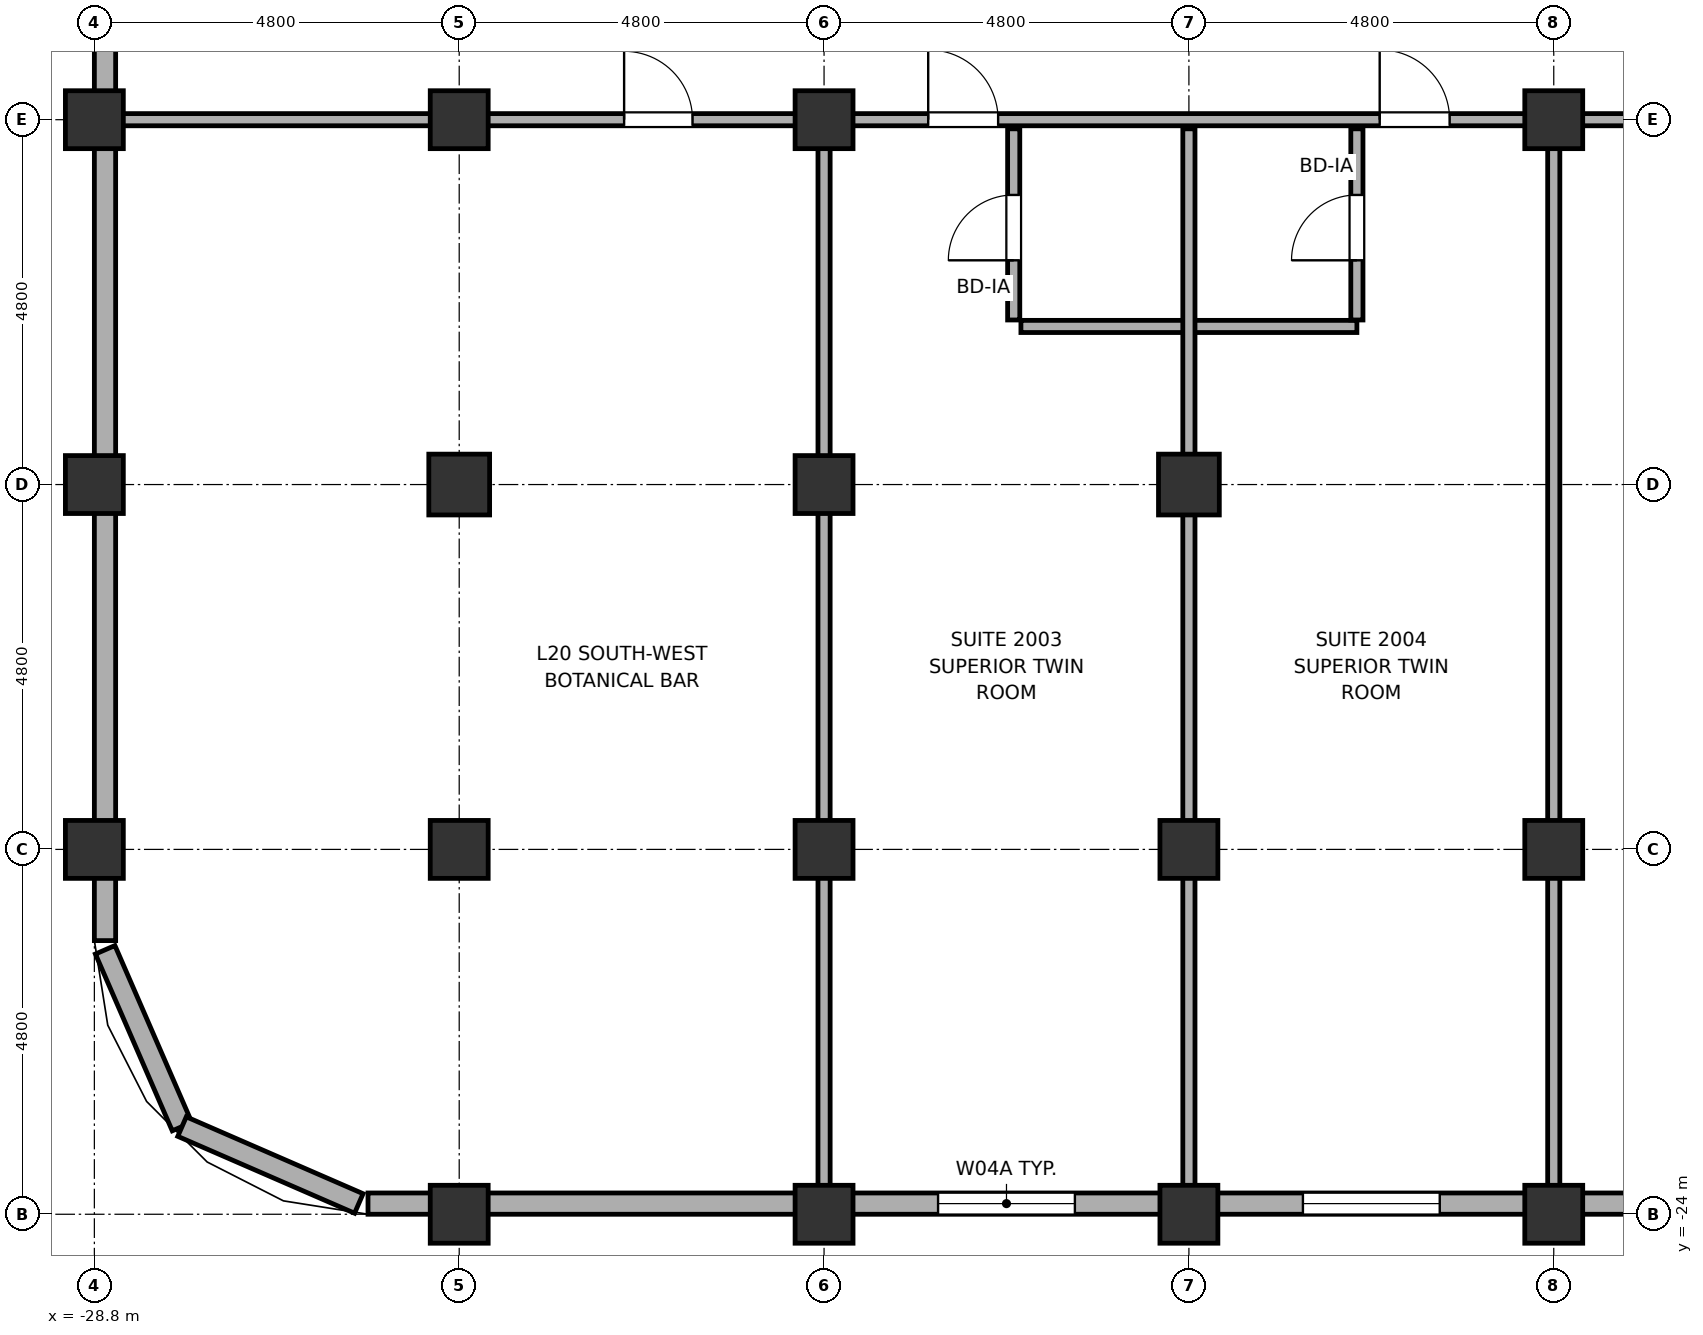
"""IFC4 building model, lengths in metres.
Left out: names, types, materials, properties, quantities, classifications, styles, units other than length and angle.
Written with IfcOpenShell. Run it as: python <this file> out.ifc"""

import sys

from ifc_helpers import new_model, si_unit, direction, frame, frame_2d, origin, origin_2d, place, context, subcontext, project, spatial, rectangle, hollow_rectangle, hollow_circle, extrude, element, fill, save


model = new_model("IFC4")
c1 = context("Model", 3, precision=1e-05, world=origin(), true_north=direction((0.0, 1.0)))
c2 = subcontext(c1, "Body", "Model", "MODEL_VIEW")
j1 = project(units=[si_unit("LENGTHUNIT", "METRE"), si_unit("PLANEANGLEUNIT", "RADIAN")], contexts=[c1])
p1 = place(None, origin())
s1 = spatial("IfcSite", under=j1, at=p1, CompositionType="ELEMENT")
p2 = place(p1, origin())
s2 = spatial("IfcBuilding", under=s1, at=p2, CompositionType="ELEMENT")
p3 = place(p2, frame((0.0, 0.0, 85.5)))
s3 = spatial("IfcBuildingStorey", under=s2, at=p3, CompositionType="ELEMENT", Elevation=85.5)
for number, where, z_axis, x_axis in (
    (1, (-28.8, -19.2, 0.0), (0.0, 0.0, 1.0), (1.0, 0.0, 0.0)),
    (2, (-28.8, -14.4, 0.0), (0.0, 0.0, 1.0), (1.0, 0.0, 0.0)),
    (3, (-28.8, -9.6, 0.0), (0.0, 0.0, 1.0), (1.0, 0.0, 0.0)),
    (4, (-24.0, -24.0, 0.0), (0.0, 0.0, 1.0), (1.0, 0.0, 0.0)),
    (5, (-24.0, -19.2, 0.0), (0.0, 0.0, 1.0), (1.0, 0.0, 0.0)),
):
    element("IfcColumn", number, at=place(p3, frame(where, z_axis=z_axis, x_axis=x_axis)), inside=s3, PredefinedType="COLUMN", context=c2, shape_type="SweptSolid", body=[
        extrude(hollow_circle(Radius=0.381, WallThickness=0.032, at=origin_2d()), origin(), (0.0, 0.0, 1.0), 3.7),
    ])
p4 = place(p3, frame((-24.0, -14.4, 0.0), z_axis=(0.0, 0.0, 1.0), x_axis=(1.0, 0.0, 0.0)))
e6 = element("IfcColumn", 6, at=p4, inside=s3, PredefinedType="COLUMN", context=c2, shape_type="SweptSolid", body=[
    extrude(hollow_rectangle(XDim=0.8, YDim=0.8, WallThickness=0.036, at=origin_2d()), origin(), (0.0, 0.0, 1.0), 3.7),
])
for number, where, z_axis, x_axis in (
    (7, (-24.0, -9.6, 0.0), (0.0, 0.0, 1.0), (1.0, 0.0, 0.0)),
    (8, (-19.2, -24.0, 0.0), (0.0, 0.0, 1.0), (1.0, 0.0, 0.0)),
    (9, (-19.2, -19.2, 0.0), (0.0, 0.0, 1.0), (1.0, 0.0, 0.0)),
    (10, (-19.2, -14.4, 0.0), (0.0, 0.0, 1.0), (1.0, 0.0, 0.0)),
    (11, (-19.2, -9.6, 0.0), (0.0, 0.0, 1.0), (1.0, 0.0, 0.0)),
    (12, (-14.4, -24.0, 0.0), (0.0, 0.0, 1.0), (1.0, 0.0, 0.0)),
    (13, (-14.4, -19.2, 0.0), (0.0, 0.0, 1.0), (1.0, 0.0, 0.0)),
):
    element("IfcColumn", number, at=place(p3, frame(where, z_axis=z_axis, x_axis=x_axis)), inside=s3, PredefinedType="COLUMN", context=c2, shape_type="SweptSolid", body=[
        extrude(hollow_circle(Radius=0.381, WallThickness=0.032, at=origin_2d()), origin(), (0.0, 0.0, 1.0), 3.7),
    ])
p5 = place(p3, frame((-14.4, -14.4, 0.0), z_axis=(0.0, 0.0, 1.0), x_axis=(1.0, 0.0, 0.0)))
e14 = element("IfcColumn", 14, at=p5, inside=s3, PredefinedType="COLUMN", context=c2, shape_type="SweptSolid", body=[
    extrude(hollow_rectangle(XDim=0.8, YDim=0.8, WallThickness=0.036, at=origin_2d()), origin(), (0.0, 0.0, 1.0), 3.7),
])
for number, where, z_axis, x_axis in (
    (15, (-9.6, -24.0, 0.0), (0.0, 0.0, 1.0), (1.0, 0.0, 0.0)),
    (16, (-9.6, -19.2, 0.0), (0.0, 0.0, 1.0), (1.0, 0.0, 0.0)),
    (17, (-9.6, -9.6, 0.0), (0.0, 0.0, 1.0), (1.0, 0.0, 0.0)),
):
    element("IfcColumn", number, at=place(p3, frame(where, z_axis=z_axis, x_axis=x_axis)), inside=s3, PredefinedType="COLUMN", context=c2, shape_type="SweptSolid", body=[
        extrude(hollow_circle(Radius=0.381, WallThickness=0.032, at=origin_2d()), origin(), (0.0, 0.0, 1.0), 3.7),
    ])
p6 = place(p3, frame((-28.658, -20.521, 0.0), z_axis=(0.0, 0.0, 1.0), x_axis=(0.398792985289, -0.917040977756, 0.0)))
e18 = element("IfcWall", 18, at=p6, inside=s3, PredefinedType="SOLIDWALL", context=c2, shape_type="SweptSolid", body=[
    extrude(rectangle(XDim=2.536, YDim=0.28, at=frame_2d((1.268, 0.0))), origin(), (0.0, 0.0, 1.0), 2.05),
])
p7 = place(p3, frame((-27.646, -22.847, 0.0), z_axis=(0.0, 0.0, 1.0), x_axis=(0.917060872934, -0.398747232384, 0.0)))
e19 = element("IfcWall", 19, at=p7, inside=s3, PredefinedType="SOLIDWALL", context=c2, shape_type="SweptSolid", body=[
    extrude(rectangle(XDim=2.536, YDim=0.28, at=frame_2d((1.268, 0.0))), origin(), (0.0, 0.0, 1.0), 2.05),
])
p8 = place(p3, frame((-25.2, -23.86, 0.0), z_axis=(0.0, 0.0, 1.0), x_axis=(1.0, 0.0, 0.0)))
e20 = element("IfcWall", 20, at=p8, inside=s3, PredefinedType="SOLIDWALL", context=c2, shape_type="SweptSolid", body=[
    extrude(rectangle(XDim=20.45, YDim=0.28, at=frame_2d((10.225, 0.0))), origin(), (0.0, 0.0, 1.0), 2.05),
])
p9 = place(p8, frame((7.5, 0.0, 0.75)))
e21 = element("IfcOpeningElement", 21, at=p9, cuts=e20, PredefinedType="OPENING", context=c2, shape_type="SweptSolid", body=[
    extrude(rectangle(XDim=1.8, YDim=1.15, at=frame_2d((0.9, 0.575))), frame((0.0, 0.155, 0.0), z_axis=(0.0, -1.0, 0.0), x_axis=(1.0, 0.0, 0.0)), (0.0, 0.0, 1.0), 0.31),
])
p10 = place(p8, frame((12.3, 0.0, 0.75)))
e22 = element("IfcOpeningElement", 22, at=p10, cuts=e20, PredefinedType="OPENING", context=c2, shape_type="SweptSolid", body=[
    extrude(rectangle(XDim=1.8, YDim=1.15, at=frame_2d((0.9, 0.575))), frame((0.0, 0.155, 0.0), z_axis=(0.0, -1.0, 0.0), x_axis=(1.0, 0.0, 0.0)), (0.0, 0.0, 1.0), 0.31),
])
p11 = place(p8, frame((17.1, 0.0, 0.75)))
e23 = element("IfcOpeningElement", 23, at=p11, cuts=e20, PredefinedType="OPENING", context=c2, shape_type="SweptSolid", body=[
    extrude(rectangle(XDim=1.8, YDim=1.15, at=frame_2d((0.9, 0.575))), frame((0.0, 0.155, 0.0), z_axis=(0.0, -1.0, 0.0), x_axis=(1.0, 0.0, 0.0)), (0.0, 0.0, 1.0), 0.31),
])
p12 = place(p3, frame((-28.66, -20.4, 0.0), z_axis=(0.0, 0.0, 1.0), x_axis=(0.0, 1.0, 0.0)))
e24 = element("IfcWall", 24, at=p12, inside=s3, PredefinedType="SOLIDWALL", context=c2, shape_type="SweptSolid", body=[
    extrude(rectangle(XDim=20.38, YDim=0.28, at=frame_2d((10.19, 0.0))), origin(), (0.0, 0.0, 1.0), 2.05),
])
p13 = place(p12, frame((17.25, 0.0, 0.75)))
e25 = element("IfcOpeningElement", 25, at=p13, cuts=e24, PredefinedType="OPENING", context=c2, shape_type="SweptSolid", body=[
    extrude(rectangle(XDim=1.5, YDim=1.15, at=frame_2d((0.75, 0.575))), frame((0.0, 0.155, 0.0), z_axis=(0.0, -1.0, 0.0), x_axis=(1.0, 0.0, 0.0)), (0.0, 0.0, 1.0), 0.31),
])
p14 = place(p3, frame((-16.61, -12.32, 0.0), z_axis=(0.0, 0.0, 1.0), x_axis=(1.0, 0.0, 0.0)))
e26 = element("IfcWall", 26, at=p14, inside=s3, PredefinedType="PARTITIONING", context=c2, shape_type="SweptSolid", body=[
    extrude(rectangle(XDim=4.42, YDim=0.16, at=frame_2d((2.21, 0.0))), origin(), (0.0, 0.0, 1.0), 2.75),
])
p15 = place(p3, frame((-28.51, -9.6, 0.0), z_axis=(0.0, 0.0, 1.0), x_axis=(1.0, 0.0, 0.0)))
e27 = element("IfcWall", 27, at=p15, inside=s3, PredefinedType="PARTITIONING", context=c2, shape_type="SweptSolid", body=[
    extrude(rectangle(XDim=61.82, YDim=0.16, at=frame_2d((30.91, 0.0))), origin(), (0.0, 0.0, 1.0), 2.05),
])
p16 = place(p15, frame((6.679, 0.0, 0.0)))
e28 = element("IfcOpeningElement", 28, at=p16, cuts=e27, PredefinedType="OPENING", context=c2, shape_type="SweptSolid", body=[
    extrude(rectangle(XDim=0.9, YDim=2.02, at=frame_2d((0.45, 1.01))), frame((0.0, 0.095, 0.0), z_axis=(0.0, -1.0, 0.0), x_axis=(1.0, 0.0, 0.0)), (0.0, 0.0, 1.0), 0.19),
])
p17 = place(p15, frame((54.5, 0.0, 0.0)))
e29 = element("IfcOpeningElement", 29, at=p17, cuts=e27, PredefinedType="OPENING", context=c2, shape_type="SweptSolid", body=[
    extrude(rectangle(XDim=0.9, YDim=2.02, at=frame_2d((0.45, 1.01))), frame((0.0, 0.095, 0.0), z_axis=(0.0, -1.0, 0.0), x_axis=(1.0, 0.0, 0.0)), (0.0, 0.0, 1.0), 0.19),
])
p18 = place(p15, frame((10.68, 0.0, 0.0)))
e30 = element("IfcOpeningElement", 30, at=p18, cuts=e27, PredefinedType="OPENING", context=c2, shape_type="SweptSolid", body=[
    extrude(rectangle(XDim=0.92, YDim=2.02, at=frame_2d((0.46, 1.01))), frame((0.0, 0.095, 0.0), z_axis=(0.0, -1.0, 0.0), x_axis=(1.0, 0.0, 0.0)), (0.0, 0.0, 1.0), 0.19),
])
p19 = place(p15, frame((16.62, 0.0, 0.0)))
e31 = element("IfcOpeningElement", 31, at=p19, cuts=e27, PredefinedType="OPENING", context=c2, shape_type="SweptSolid", body=[
    extrude(rectangle(XDim=0.92, YDim=2.02, at=frame_2d((0.46, 1.01))), frame((0.0, 0.095, 0.0), z_axis=(0.0, -1.0, 0.0), x_axis=(1.0, 0.0, 0.0)), (0.0, 0.0, 1.0), 0.19),
])
p20 = place(p15, frame((20.28, 0.0, 0.0)))
e32 = element("IfcOpeningElement", 32, at=p20, cuts=e27, PredefinedType="OPENING", context=c2, shape_type="SweptSolid", body=[
    extrude(rectangle(XDim=0.92, YDim=2.02, at=frame_2d((0.46, 1.01))), frame((0.0, 0.095, 0.0), z_axis=(0.0, -1.0, 0.0), x_axis=(1.0, 0.0, 0.0)), (0.0, 0.0, 1.0), 0.19),
])
p21 = place(p15, frame((26.22, 0.0, 0.0)))
e33 = element("IfcOpeningElement", 33, at=p21, cuts=e27, PredefinedType="OPENING", context=c2, shape_type="SweptSolid", body=[
    extrude(rectangle(XDim=0.92, YDim=2.02, at=frame_2d((0.46, 1.01))), frame((0.0, 0.095, 0.0), z_axis=(0.0, -1.0, 0.0), x_axis=(1.0, 0.0, 0.0)), (0.0, 0.0, 1.0), 0.19),
])
p22 = place(p15, frame((29.88, 0.0, 0.0)))
e34 = element("IfcOpeningElement", 34, at=p22, cuts=e27, PredefinedType="OPENING", context=c2, shape_type="SweptSolid", body=[
    extrude(rectangle(XDim=0.92, YDim=2.02, at=frame_2d((0.46, 1.01))), frame((0.0, 0.095, 0.0), z_axis=(0.0, -1.0, 0.0), x_axis=(1.0, 0.0, 0.0)), (0.0, 0.0, 1.0), 0.19),
])
p23 = place(p15, frame((35.82, 0.0, 0.0)))
e35 = element("IfcOpeningElement", 35, at=p23, cuts=e27, PredefinedType="OPENING", context=c2, shape_type="SweptSolid", body=[
    extrude(rectangle(XDim=0.92, YDim=2.02, at=frame_2d((0.46, 1.01))), frame((0.0, 0.095, 0.0), z_axis=(0.0, -1.0, 0.0), x_axis=(1.0, 0.0, 0.0)), (0.0, 0.0, 1.0), 0.19),
])
p24 = place(p15, frame((40.06, 0.0, 0.0)))
e36 = element("IfcOpeningElement", 36, at=p24, cuts=e27, PredefinedType="OPENING", context=c2, shape_type="SweptSolid", body=[
    extrude(rectangle(XDim=0.9, YDim=2.02, at=frame_2d((0.45, 1.01))), frame((0.0, 0.095, 0.0), z_axis=(0.0, -1.0, 0.0), x_axis=(1.0, 0.0, 0.0)), (0.0, 0.0, 1.0), 0.19),
])
p25 = place(p15, frame((44.86, 0.0, 0.0)))
e37 = element("IfcOpeningElement", 37, at=p25, cuts=e27, PredefinedType="OPENING", context=c2, shape_type="SweptSolid", body=[
    extrude(rectangle(XDim=0.9, YDim=2.02, at=frame_2d((0.45, 1.01))), frame((0.0, 0.095, 0.0), z_axis=(0.0, -1.0, 0.0), x_axis=(1.0, 0.0, 0.0)), (0.0, 0.0, 1.0), 0.19),
])
p26 = place(p15, frame((49.08, 0.0, 0.0)))
e38 = element("IfcOpeningElement", 38, at=p26, cuts=e27, PredefinedType="OPENING", context=c2, shape_type="SweptSolid", body=[
    extrude(rectangle(XDim=0.92, YDim=2.02, at=frame_2d((0.46, 1.01))), frame((0.0, 0.095, 0.0), z_axis=(0.0, -1.0, 0.0), x_axis=(1.0, 0.0, 0.0)), (0.0, 0.0, 1.0), 0.19),
])
p27 = place(p3, frame((-19.2, -23.71, 0.0), z_axis=(0.0, 0.0, 1.0), x_axis=(0.0, 1.0, 0.0)))
e39 = element("IfcWall", 39, at=p27, inside=s3, PredefinedType="PARTITIONING", context=c2, shape_type="SweptSolid", body=[
    extrude(rectangle(XDim=13.99, YDim=0.16, at=frame_2d((6.995, 0.0))), origin(), (0.0, 0.0, 1.0), 2.05),
])
p28 = place(p3, frame((-16.705, -12.235, 0.0), z_axis=(0.0, 0.0, 1.0), x_axis=(0.0, 1.0, 0.0)))
e40 = element("IfcWall", 40, at=p28, inside=s3, PredefinedType="PARTITIONING", context=c2, shape_type="SweptSolid", body=[
    extrude(rectangle(XDim=2.515, YDim=0.16, at=frame_2d((1.258, 0.0))), origin(), (0.0, 0.0, 1.0), 2.05),
])
p29 = place(p28, frame((0.785, 0.0, 0.0)))
e41 = element("IfcOpeningElement", 41, at=p29, cuts=e40, PredefinedType="OPENING", context=c2, shape_type="SweptSolid", body=[
    extrude(rectangle(XDim=0.86, YDim=2.02, at=frame_2d((0.43, 1.01))), frame((0.0, 0.095, 0.0), z_axis=(0.0, -1.0, 0.0), x_axis=(1.0, 0.0, 0.0)), (0.0, 0.0, 1.0), 0.19),
])
p30 = place(p3, frame((-14.4, -23.71, 0.0), z_axis=(0.0, 0.0, 1.0), x_axis=(0.0, 1.0, 0.0)))
e42 = element("IfcWall", 42, at=p30, inside=s3, PredefinedType="PARTITIONING", context=c2, shape_type="SweptSolid", body=[
    extrude(rectangle(XDim=13.99, YDim=0.16, at=frame_2d((6.995, 0.0))), origin(), (0.0, 0.0, 1.0), 2.05),
])
p31 = place(p3, frame((-12.19, -12.235, 0.0), z_axis=(0.0, 0.0, 1.0), x_axis=(0.0, 1.0, 0.0)))
e43 = element("IfcWall", 43, at=p31, inside=s3, PredefinedType="PARTITIONING", context=c2, shape_type="SweptSolid", body=[
    extrude(rectangle(XDim=2.515, YDim=0.16, at=frame_2d((1.258, 0.0))), origin(), (0.0, 0.0, 1.0), 2.05),
])
p32 = place(p31, frame((0.785, 0.0, 0.0)))
e44 = element("IfcOpeningElement", 44, at=p32, cuts=e43, PredefinedType="OPENING", context=c2, shape_type="SweptSolid", body=[
    extrude(rectangle(XDim=0.86, YDim=2.02, at=frame_2d((0.43, 1.01))), frame((0.0, 0.095, 0.0), z_axis=(0.0, -1.0, 0.0), x_axis=(1.0, 0.0, 0.0)), (0.0, 0.0, 1.0), 0.19),
])
p33 = place(p3, frame((-9.6, -23.71, 0.0), z_axis=(0.0, 0.0, 1.0), x_axis=(0.0, 1.0, 0.0)))
e45 = element("IfcWall", 45, at=p33, inside=s3, PredefinedType="PARTITIONING", context=c2, shape_type="SweptSolid", body=[
    extrude(rectangle(XDim=13.99, YDim=0.16, at=frame_2d((6.995, 0.0))), origin(), (0.0, 0.0, 1.0), 2.05),
])
p34 = place(p9, origin())
e46 = element("IfcWindow", 46, at=p34, inside=s3, PartitioningType="SINGLE_PANEL", PredefinedType="WINDOW", context=c2, shape_type="SweptSolid", body=[
    extrude(rectangle(XDim=1.8, YDim=1.15, at=frame_2d((0.9, 0.575))), frame((0.0, 0.03, 0.0), z_axis=(0.0, -1.0, 0.0), x_axis=(1.0, 0.0, 0.0)), (0.0, 0.0, 1.0), 0.06),
])
fill(e21, e46)
p35 = place(p10, origin())
e47 = element("IfcWindow", 47, at=p35, inside=s3, PartitioningType="SINGLE_PANEL", PredefinedType="WINDOW", context=c2, shape_type="SweptSolid", body=[
    extrude(rectangle(XDim=1.8, YDim=1.15, at=frame_2d((0.9, 0.575))), frame((0.0, 0.03, 0.0), z_axis=(0.0, -1.0, 0.0), x_axis=(1.0, 0.0, 0.0)), (0.0, 0.0, 1.0), 0.06),
])
fill(e22, e47)
p36 = place(p16, origin())
e48 = element("IfcDoor", 48, at=p36, inside=s3, OperationType="SINGLE_SWING_LEFT", PredefinedType="DOOR", context=c2, shape_type="SweptSolid", body=[
    extrude(rectangle(XDim=0.9, YDim=2.02, at=frame_2d((0.45, 1.01))), frame((0.0, 0.025, 0.0), z_axis=(0.0, -1.0, 0.0), x_axis=(1.0, 0.0, 0.0)), (0.0, 0.0, 1.0), 0.05),
])
fill(e28, e48)
p37 = place(p18, origin())
e49 = element("IfcDoor", 49, at=p37, inside=s3, OperationType="SINGLE_SWING_RIGHT", PredefinedType="DOOR", context=c2, shape_type="SweptSolid", body=[
    extrude(rectangle(XDim=0.92, YDim=2.02, at=frame_2d((0.46, 1.01))), frame((0.0, 0.025, 0.0), z_axis=(0.0, -1.0, 0.0), x_axis=(1.0, 0.0, 0.0)), (0.0, 0.0, 1.0), 0.05),
])
fill(e30, e49)
p38 = place(p29, origin())
e50 = element("IfcDoor", 50, at=p38, inside=s3, OperationType="SINGLE_SWING_LEFT", PredefinedType="DOOR", context=c2, shape_type="SweptSolid", body=[
    extrude(rectangle(XDim=0.86, YDim=2.02, at=frame_2d((0.43, 1.01))), frame((0.0, 0.025, 0.0), z_axis=(0.0, -1.0, 0.0), x_axis=(1.0, 0.0, 0.0)), (0.0, 0.0, 1.0), 0.05),
])
fill(e41, e50)
p39 = place(p19, origin())
e51 = element("IfcDoor", 51, at=p39, inside=s3, OperationType="SINGLE_SWING_LEFT", PredefinedType="DOOR", context=c2, shape_type="SweptSolid", body=[
    extrude(rectangle(XDim=0.92, YDim=2.02, at=frame_2d((0.46, 1.01))), frame((0.0, 0.025, 0.0), z_axis=(0.0, -1.0, 0.0), x_axis=(1.0, 0.0, 0.0)), (0.0, 0.0, 1.0), 0.05),
])
fill(e31, e51)
p40 = place(p32, origin())
e52 = element("IfcDoor", 52, at=p40, inside=s3, OperationType="SINGLE_SWING_LEFT", PredefinedType="DOOR", context=c2, shape_type="SweptSolid", body=[
    extrude(rectangle(XDim=0.86, YDim=2.02, at=frame_2d((0.43, 1.01))), frame((0.0, 0.025, 0.0), z_axis=(0.0, -1.0, 0.0), x_axis=(1.0, 0.0, 0.0)), (0.0, 0.0, 1.0), 0.05),
])
fill(e44, e52)
save(model, sys.argv[1])
